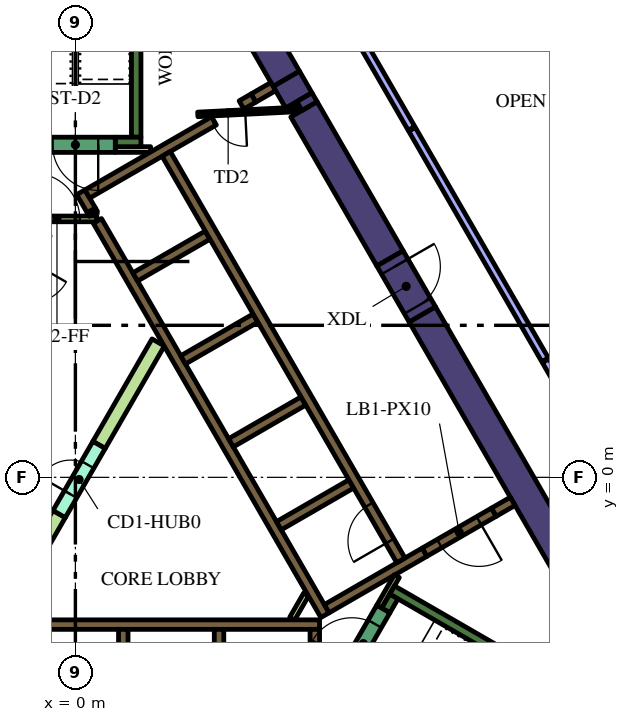
"""IFC4 building model, lengths in metres.
Left out: names, types, materials, properties, quantities, classifications, styles, units other than length and angle.
Written with IfcOpenShell. Run it as: python <this file> out.ifc"""

import sys

from ifc_helpers import new_model, si_unit, direction, frame, frame_2d, origin, place, context, subcontext, project, spatial, polyline, rectangle, outline, extrude, element, fill, save


model = new_model("IFC4")
c1 = context("Model", 3, precision=1e-05, world=origin(), true_north=direction((0.0, 1.0)))
c2 = subcontext(c1, "Body", "Model", "MODEL_VIEW")
j1 = project(units=[si_unit("LENGTHUNIT", "METRE"), si_unit("PLANEANGLEUNIT", "RADIAN")], contexts=[c1])
p1 = place(None, origin())
s1 = spatial("IfcSite", under=j1, at=p1, CompositionType="ELEMENT")
p2 = place(p1, origin())
s2 = spatial("IfcBuilding", under=s1, at=p2, CompositionType="ELEMENT")
p3 = place(p2, frame((0.0, 0.0, 183.6)))
s3 = spatial("IfcBuildingStorey", under=s2, at=p3, CompositionType="ELEMENT", Elevation=183.6)
p4 = place(p3, frame((9.129, 4.289, 0.0), z_axis=(0.0, 0.0, 1.0), x_axis=(0.499995742806, -0.866027861663, 0.0)))
e1 = element("IfcWall", 1, at=p4, inside=s3, PredefinedType="SOLIDWALL", context=c2, shape_type="SweptSolid", body=[
    extrude(rectangle(XDim=12.527, YDim=0.8, at=frame_2d((6.264, 0.0))), origin(), (0.0, 0.0, 1.0), 4.2),
])
p5 = place(p3, frame((5.878, 9.918, 0.0), z_axis=(0.0, 0.0, 1.0), x_axis=(-0.499893918903, 0.866086641072, 0.0)))
e2 = element("IfcWall", 2, at=p5, inside=s3, PredefinedType="SOLIDWALL", context=c2, shape_type="SweptSolid", body=[
    extrude(rectangle(XDim=0.657, YDim=0.8, at=frame_2d((0.329, 0.0))), origin(), (0.0, 0.0, 1.0), 4.2),
])
p6 = place(p3, frame((8.279, 5.761, 0.0), z_axis=(0.0, 0.0, 1.0), x_axis=(-0.500024261398, 0.866011396007, 0.0)))
e3 = element("IfcWall", 3, at=p6, inside=s3, PredefinedType="SOLIDWALL", context=c2, shape_type="SweptSolid", body=[
    extrude(rectangle(XDim=4.528, YDim=0.8, at=frame_2d((2.264, 0.0))), origin(), (0.0, 0.0, 1.0), 4.2),
])
p7 = place(p3, origin())
e4 = element("IfcWall", 4, at=p7, inside=s3, PredefinedType="SOLIDWALL", context=c2, shape_type="SweptSolid", body=[
    extrude(outline(polyline([(5.961, 9.654), (5.827, 9.886), (6.226, 10.116), (6.36, 9.884), (5.961, 9.654)])), origin(), (0.0, 0.0, 1.0), 4.2),
])
p8 = place(p3, frame((5.549, 10.489, 0.0), z_axis=(0.0, 0.0, 1.0), x_axis=(-0.50001746176, 0.866015321998, 0.0)))
e5 = element("IfcWall", 5, at=p8, inside=s3, PredefinedType="SOLIDWALL", context=c2, shape_type="SweptSolid", body=[
    extrude(rectangle(XDim=7.068, YDim=0.8, at=frame_2d((3.534, 0.0))), origin(), (0.0, 0.0, 1.0), 4.2),
])
p9 = place(p3, frame((8.334, -2.964, 0.0), z_axis=(0.0, 0.0, 1.0), x_axis=(0.866016039709, -0.500016218704, 0.0)))
e6 = element("IfcWall", 6, at=p9, inside=s3, PredefinedType="SOLIDWALL", context=c2, shape_type="SweptSolid", body=[
    extrude(rectangle(XDim=7.05, YDim=0.25, at=frame_2d((3.525, 0.0))), origin(), (0.0, 0.0, 1.0), 4.2),
])
p10 = place(p3, frame((8.168, -3.503, 0.0), z_axis=(0.0, 0.0, 1.0), x_axis=(0.49972245349, 0.866185586049, 0.0)))
e7 = element("IfcWall", 7, at=p10, inside=s3, PredefinedType="SOLIDWALL", context=c2, shape_type="SweptSolid", body=[
    extrude(rectangle(XDim=0.425, YDim=0.25, at=frame_2d((0.212, 0.0))), origin(), (0.0, 0.0, 1.0), 4.2),
])
p11 = place(p3, frame((1.6, 8.95, 0.0), z_axis=(0.0, 0.0, 1.0), x_axis=(0.0, 1.0, 0.0)))
e8 = element("IfcWall", 8, at=p11, inside=s3, PredefinedType="SOLIDWALL", context=c2, shape_type="SweptSolid", body=[
    extrude(rectangle(XDim=6.8, YDim=0.25, at=frame_2d((3.4, 0.0))), origin(), (0.0, 0.0, 1.0), 4.2),
])
p12 = place(p3, frame((1.05, 8.825, 0.0), z_axis=(0.0, 0.0, 1.0), x_axis=(1.0, 0.0, 0.0)))
e9 = element("IfcWall", 9, at=p12, inside=s3, PredefinedType="SOLIDWALL", context=c2, shape_type="SweptSolid", body=[
    extrude(rectangle(XDim=0.675, YDim=0.25, at=frame_2d((0.337, 0.0))), origin(), (0.0, 0.0, 1.0), 4.2),
])
p13 = place(p3, frame((-5.545, -3.875, 0.0), z_axis=(0.0, 0.0, 1.0), x_axis=(1.0, 0.0, 0.0)))
e10 = element("IfcWall", 10, at=p13, inside=s3, PredefinedType="SOLIDWALL", context=c2, shape_type="SweptSolid", body=[
    extrude(rectangle(XDim=11.97, YDim=0.25, at=frame_2d((5.985, 0.0))), origin(), (0.0, 0.0, 1.0), 4.2),
])
p14 = place(p3, frame((6.3, -7.24, 0.0), z_axis=(0.0, 0.0, 1.0), x_axis=(0.0, 1.0, 0.0)))
e11 = element("IfcWall", 11, at=p14, inside=s3, PredefinedType="SOLIDWALL", context=c2, shape_type="SweptSolid", body=[
    extrude(rectangle(XDim=3.24, YDim=0.25, at=frame_2d((1.62, 0.0))), origin(), (0.0, 0.0, 1.0), 4.2),
])
for number, where, z_axis, x_axis in (
    (12, (3.78, -4.0, 0.0), (0.0, 0.0, 1.0), (0.0, -1.0, 0.0)),
    (13, (1.26, -4.0, 0.0), (0.0, 0.0, 1.0), (0.0, -1.0, 0.0)),
):
    element("IfcWall", number, at=place(p3, frame(where, z_axis=z_axis, x_axis=x_axis)), inside=s3, PredefinedType="SOLIDWALL", context=c2, shape_type="SweptSolid", body=[
        extrude(rectangle(XDim=2.2, YDim=0.25, at=frame_2d((1.1, 0.0))), origin(), (0.0, 0.0, 1.0), 4.2),
    ])
p15 = place(p3, frame((11.507, -0.631, 0.0), z_axis=(0.0, 0.0, 1.0), x_axis=(-0.866093731455, -0.499881634324, 0.0)))
e14 = element("IfcWall", 14, at=p15, inside=s3, PredefinedType="SOLIDWALL", context=c2, shape_type="SweptSolid", body=[
    extrude(rectangle(XDim=0.575, YDim=0.25, at=frame_2d((0.288, 0.0))), origin(), (0.0, 0.0, 1.0), 4.2),
])
p16 = place(p3, frame((0.473, 6.93, 0.0), z_axis=(0.0, 0.0, 1.0), x_axis=(-0.49972245349, 0.866185586049, 0.0)))
e15 = element("IfcWall", 15, at=p16, inside=s3, PredefinedType="SOLIDWALL", context=c2, shape_type="SweptSolid", body=[
    extrude(rectangle(XDim=0.11, YDim=0.25, at=frame_2d((0.055, 0.0))), origin(), (0.0, 0.0, 1.0), 4.2),
])
p17 = place(p3, frame((6.568, -3.627, 0.0), z_axis=(0.0, 0.0, 1.0), x_axis=(-0.499999455981, 0.866025717874, 0.0)))
e16 = element("IfcWall", 16, at=p17, inside=s3, PredefinedType="SOLIDWALL", context=c2, shape_type="SweptSolid", body=[
    extrude(rectangle(XDim=11.978, YDim=0.25, at=frame_2d((5.989, 0.0))), origin(), (0.0, 0.0, 1.0), 4.2),
])
p18 = place(p3, frame((0.417, 7.027, 0.0), z_axis=(0.0, 0.0, 1.0), x_axis=(-0.500210807569, 0.865903659763, 0.0)))
e17 = element("IfcWall", 17, at=p18, inside=s3, PredefinedType="SOLIDWALL", context=c2, shape_type="SweptSolid", body=[
    extrude(rectangle(XDim=0.548, YDim=0.25, at=frame_2d((0.274, 0.0))), origin(), (0.0, 0.0, 1.0), 4.2),
])
p19 = place(p3, frame((3.647, 9.38, 0.0), z_axis=(0.0, 0.0, 1.0), x_axis=(-0.866025015791, -0.500000672024, 0.0)))
e18 = element("IfcWall", 18, at=p19, inside=s3, PredefinedType="SOLIDWALL", context=c2, shape_type="SweptSolid", body=[
    extrude(rectangle(XDim=3.849, YDim=0.25, at=frame_2d((1.924, 0.0))), origin(), (0.0, 0.0, 1.0), 4.2),
])
p20 = place(p3, frame((1.574, 5.274, 0.0), z_axis=(0.0, 0.0, 1.0), x_axis=(0.866028486751, 0.499994660107, 0.0)))
e19 = element("IfcWall", 19, at=p20, inside=s3, PredefinedType="SOLIDWALL", context=c2, shape_type="SweptSolid", body=[
    extrude(rectangle(XDim=2.2, YDim=0.25, at=frame_2d((1.1, 0.0))), origin(), (0.0, 0.0, 1.0), 4.2),
])
for number, where, z_axis, x_axis in (
    (20, (2.834, 3.091, 0.0), (0.0, 0.0, 1.0), (0.866, 0.5, 0.0)),
    (21, (4.094, 0.909, 0.0), (0.0, 0.0, 1.0), (0.866, 0.5, 0.0)),
    (22, (5.354, -1.274, 0.0), (0.0, 0.0, 1.0), (0.866, 0.5, 0.0)),
):
    element("IfcWall", number, at=place(p3, frame(where, z_axis=z_axis, x_axis=x_axis)), inside=s3, PredefinedType="SOLIDWALL", context=c2, shape_type="SweptSolid", body=[
        extrude(rectangle(XDim=2.2, YDim=0.25, at=frame_2d((1.1, 0.0))), origin(), (0.0, 0.0, 1.0), 4.2),
    ])
p21 = place(p3, frame((6.614, -3.456, 0.0), z_axis=(0.0, 0.0, 1.0), x_axis=(0.866032512851, 0.499987686533, 0.0)))
e23 = element("IfcWall", 23, at=p21, inside=s3, PredefinedType="SOLIDWALL", context=c2, shape_type="SweptSolid", body=[
    extrude(rectangle(XDim=2.975, YDim=0.25, at=frame_2d((1.487, 0.0))), origin(), (0.0, 0.0, 1.0), 4.2),
])
p22 = place(p3, frame((4.688, 9.981, 0.0), z_axis=(0.0, 0.0, 1.0), x_axis=(-0.865974312977, -0.500088481434, 0.0)))
e24 = element("IfcWall", 24, at=p22, inside=s3, PredefinedType="SOLIDWALL", context=c2, shape_type="SweptSolid", body=[
    extrude(rectangle(XDim=0.366, YDim=0.25, at=frame_2d((0.183, 0.0))), origin(), (0.0, 0.0, 1.0), 4.2),
])
p23 = place(p3, frame((4.689, 9.982, 0.0), z_axis=(0.0, 0.0, 1.0), x_axis=(0.865947592822, 0.500134748329, 0.0)))
e25 = element("IfcWall", 25, at=p23, inside=s3, PredefinedType="SOLIDWALL", context=c2, shape_type="SweptSolid", body=[
    extrude(rectangle(XDim=0.598, YDim=0.25, at=frame_2d((0.299, 0.0))), origin(), (0.0, 0.0, 1.0), 4.2),
])
p24 = place(p3, frame((1.05, 8.625, 0.0), z_axis=(0.0, 0.0, 1.0), x_axis=(1.0, 0.0, 0.0)))
e26 = element("IfcWall", 26, at=p24, inside=s3, PredefinedType="PARTITIONING", context=c2, shape_type="SweptSolid", body=[
    extrude(rectangle(XDim=0.929, YDim=0.15, at=frame_2d((0.464, 0.0))), origin(), (0.0, 0.0, 1.0), 3.15),
])
p25 = place(p3, frame((8.459, -2.599, 0.0), z_axis=(0.0, 0.0, 1.0), x_axis=(-0.500041054325, -0.866001699761, 0.0)))
e27 = element("IfcWall", 27, at=p25, inside=s3, PredefinedType="PARTITIONING", context=c2, shape_type="SweptSolid", body=[
    extrude(rectangle(XDim=0.929, YDim=0.15, at=frame_2d((0.464, 0.0))), origin(), (0.0, 0.0, 1.0), 4.2),
])
p26 = place(p3, frame((5.705, -3.718, 0.0), z_axis=(0.0, 0.0, 1.0), x_axis=(0.499962090823, 0.866047289552, 0.0)))
e28 = element("IfcWall", 28, at=p26, inside=s3, PredefinedType="PARTITIONING", context=c2, shape_type="SweptSolid", body=[
    extrude(rectangle(XDim=0.735, YDim=0.15, at=frame_2d((0.367, 0.0))), origin(), (0.0, 0.0, 1.0), 3.15),
])
e29 = element("IfcWall", 29, at=p7, inside=s3, PredefinedType="PARTITIONING", context=c2, shape_type="SweptSolid", body=[
    extrude(outline(polyline([(2.017, 3.643), (2.342, 3.456), (0.785, 0.76), (0.46, 0.947), (2.017, 3.643)])), origin(), (0.0, 0.0, 1.0), 3.15),
])
e30 = element("IfcWall", 30, at=p7, inside=s3, PredefinedType="PARTITIONING", context=c2, shape_type="SweptSolid", body=[
    extrude(outline(polyline([(-0.59, -0.872), (-0.265, -1.059), (-1.822, -3.756), (-2.147, -3.568), (-0.59, -0.872)])), origin(), (0.0, 0.0, 1.0), 3.15),
])
p27 = place(p3, frame((8.565, -2.185, 0.0), z_axis=(0.0, 0.0, 1.0), x_axis=(-0.499997954832, 0.866026584559, 0.0)))
e31 = element("IfcWall", 31, at=p27, inside=s3, PredefinedType="SOLIDWALL", context=c2, shape_type="SweptSolid", body=[
    extrude(rectangle(XDim=12.35, YDim=0.25, at=frame_2d((6.175, 0.0))), origin(), (0.0, 0.0, 1.0), 4.2),
])
p28 = place(p27, frame((0.585, 0.0, 0.0)))
e32 = element("IfcOpeningElement", 32, at=p28, cuts=e31, PredefinedType="OPENING", context=c2, shape_type="SweptSolid", body=[
    extrude(rectangle(XDim=1.1, YDim=2.1, at=frame_2d((0.55, 1.05))), frame((0.0, 0.135, 0.0), z_axis=(0.0, -1.0, 0.0), x_axis=(1.0, 0.0, 0.0)), (0.0, 0.0, 1.0), 0.27),
])
p29 = place(p3, frame((7.053, -5.284, 0.0), z_axis=(0.0, 0.0, 1.0), x_axis=(0.500078061341, 0.865980330357, 0.0)))
e33 = element("IfcWall", 33, at=p29, inside=s3, PredefinedType="SOLIDWALL", context=c2, shape_type="SweptSolid", body=[
    extrude(rectangle(XDim=2.1, YDim=0.4, at=frame_2d((1.05, 0.0))), origin(), (0.0, 0.0, 1.0), 4.2),
])
p30 = place(p29, frame((0.45, 0.0, 0.0)))
e34 = element("IfcOpeningElement", 34, at=p30, cuts=e33, PredefinedType="OPENING", context=c2, shape_type="SweptSolid", body=[
    extrude(rectangle(XDim=1.2, YDim=2.1, at=frame_2d((0.6, 1.05))), frame((0.0, 0.21, 0.0), z_axis=(0.0, -1.0, 0.0), x_axis=(1.0, 0.0, 0.0)), (0.0, 0.0, 1.0), 0.42),
])
p31 = place(p3, frame((1.05, 8.75, 0.0), z_axis=(0.0, 0.0, 1.0), x_axis=(-1.0, 0.0, 0.0)))
e35 = element("IfcWall", 35, at=p31, inside=s3, PredefinedType="SOLIDWALL", context=c2, shape_type="SweptSolid", body=[
    extrude(rectangle(XDim=2.1, YDim=0.4, at=frame_2d((1.05, 0.0))), origin(), (0.0, 0.0, 1.0), 4.2),
])
p32 = place(p31, frame((0.45, 0.0, 0.0)))
e36 = element("IfcOpeningElement", 36, at=p32, cuts=e35, PredefinedType="OPENING", context=c2, shape_type="SweptSolid", body=[
    extrude(rectangle(XDim=1.2, YDim=2.1, at=frame_2d((0.6, 1.05))), frame((0.0, 0.21, 0.0), z_axis=(0.0, -1.0, 0.0), x_axis=(1.0, 0.0, 0.0)), (0.0, 0.0, 1.0), 0.42),
])
p33 = place(p3, frame((5.917, 9.684, 0.0), z_axis=(0.0, 0.0, 1.0), x_axis=(-0.998758194515, -0.049820366212, 0.0)))
e37 = element("IfcWall", 37, at=p33, inside=s3, PredefinedType="PARTITIONING", context=c2, shape_type="SweptSolid", body=[
    extrude(rectangle(XDim=2.7, YDim=0.12, at=frame_2d((1.35, 0.0))), origin(), (0.0, 0.0, 1.0), 3.15),
])
p34 = place(p33, frame((1.45, 0.0, 0.0)))
e38 = element("IfcOpeningElement", 38, at=p34, cuts=e37, PredefinedType="OPENING", context=c2, shape_type="SweptSolid", body=[
    extrude(rectangle(XDim=0.9, YDim=2.1, at=frame_2d((0.45, 1.05))), frame((0.0, 0.07, 0.0), z_axis=(0.0, -1.0, 0.0), x_axis=(1.0, 0.0, 0.0)), (0.0, 0.0, 1.0), 0.14),
])
p35 = place(p3, frame((-0.427, -0.966, 0.0), z_axis=(0.0, 0.0, 1.0), x_axis=(0.49994051562, 0.866059744384, 0.0)))
e39 = element("IfcWall", 39, at=p35, inside=s3, PredefinedType="PARTITIONING", context=c2, shape_type="SweptSolid", body=[
    extrude(rectangle(XDim=2.1, YDim=0.375, at=frame_2d((1.05, 0.0))), origin(), (0.0, 0.0, 1.0), 3.15),
])
p36 = place(p35, frame((0.6, 0.0, 0.0)))
e40 = element("IfcOpeningElement", 40, at=p36, cuts=e39, PredefinedType="OPENING", context=c2, shape_type="SweptSolid", body=[
    extrude(rectangle(XDim=0.9, YDim=2.1, at=frame_2d((0.45, 1.05))), frame((0.0, 0.198, 0.0), z_axis=(0.0, -1.0, 0.0), x_axis=(1.0, 0.0, 0.0)), (0.0, 0.0, 1.0), 0.395),
])
p37 = place(p3, frame((-1.534, 6.8, 0.0), z_axis=(0.0, 0.0, 1.0), x_axis=(1.0, 0.0, 0.0)))
e41 = element("IfcWall", 41, at=p37, inside=s3, PredefinedType="PARTITIONING", context=c2, shape_type="SweptSolid", body=[
    extrude(rectangle(XDim=2.1, YDim=0.15, at=frame_2d((1.05, 0.0))), origin(), (0.0, 0.0, 1.0), 3.15),
])
p38 = place(p37, frame((0.45, 0.0, 0.0)))
e42 = element("IfcOpeningElement", 42, at=p38, cuts=e41, PredefinedType="OPENING", context=c2, shape_type="SweptSolid", body=[
    extrude(rectangle(XDim=1.2, YDim=2.1, at=frame_2d((0.6, 1.05))), frame((0.0, 0.085, 0.0), z_axis=(0.0, -1.0, 0.0), x_axis=(1.0, 0.0, 0.0)), (0.0, 0.0, 1.0), 0.17),
])
p39 = place(p3, frame((11.009, -0.919, 0.0), z_axis=(0.0, 0.0, 1.0), x_axis=(-0.866059744384, -0.49994051562, 0.0)))
e43 = element("IfcWall", 43, at=p39, inside=s3, PredefinedType="SOLIDWALL", context=c2, shape_type="SweptSolid", body=[
    extrude(rectangle(XDim=2.1, YDim=0.25, at=frame_2d((1.05, 0.0))), origin(), (0.0, 0.0, 1.0), 4.2),
])
p40 = place(p39, frame((0.45, 0.0, 0.0)))
e44 = element("IfcOpeningElement", 44, at=p40, cuts=e43, PredefinedType="OPENING", context=c2, shape_type="SweptSolid", body=[
    extrude(rectangle(XDim=1.2, YDim=2.1, at=frame_2d((0.6, 1.05))), frame((0.0, 0.135, 0.0), z_axis=(0.0, -1.0, 0.0), x_axis=(1.0, 0.0, 0.0)), (0.0, 0.0, 1.0), 0.27),
])
p41 = place(p3, frame((8.279, 5.761, 0.0), z_axis=(0.0, 0.0, 1.0), x_axis=(0.500062241894, -0.865989465428, 0.0)))
e45 = element("IfcWall", 45, at=p41, inside=s3, PredefinedType="SOLIDWALL", context=c2, shape_type="SweptSolid", body=[
    extrude(rectangle(XDim=1.7, YDim=0.8, at=frame_2d((0.85, 0.0))), origin(), (0.0, 0.0, 1.0), 4.2),
])
p42 = place(p41, frame((0.25, 0.0, 0.0)))
e46 = element("IfcOpeningElement", 46, at=p42, cuts=e45, PredefinedType="OPENING", context=c2, shape_type="SweptSolid", body=[
    extrude(rectangle(XDim=1.2, YDim=2.1, at=frame_2d((0.6, 1.05))), frame((0.0, 0.41, 0.0), z_axis=(0.0, -1.0, 0.0), x_axis=(1.0, 0.0, 0.0)), (0.0, 0.0, 1.0), 0.82),
])
p43 = place(p3, frame((12.359, 3.094, 0.0), z_axis=(0.0, 0.0, 1.0), x_axis=(-0.500010275428, 0.866019471182, 0.0)))
e47 = element("IfcWall", 47, at=p43, inside=s3, PredefinedType="PARTITIONING", context=c2, shape_type="SweptSolid", body=[
    extrude(rectangle(XDim=7.0, YDim=0.2, at=frame_2d((3.5, 0.0))), origin(), (0.0, 0.0, 1.0), 3.15),
])
p44 = place(p3, frame((8.844, 9.182, 0.0), z_axis=(0.0, 0.0, 1.0), x_axis=(-0.50000000053, 0.866025403479, 0.0)))
e48 = element("IfcWall", 48, at=p44, inside=s3, PredefinedType="PARTITIONING", context=c2, shape_type="SweptSolid", body=[
    extrude(rectangle(XDim=9.188, YDim=0.2, at=frame_2d((4.594, 0.0))), origin(), (0.0, 0.0, 1.0), 3.15),
])
p45 = place(p44, frame((4.1, 0.0, 0.0)))
e49 = element("IfcOpeningElement", 49, at=p45, cuts=e48, PredefinedType="OPENING", context=c2, shape_type="SweptSolid", body=[
    extrude(rectangle(XDim=1.0, YDim=2.1, at=frame_2d((0.5, 1.05))), frame((0.0, 0.11, 0.0), z_axis=(0.0, -1.0, 0.0), x_axis=(1.0, 0.0, 0.0)), (0.0, 0.0, 1.0), 0.22),
])
p46 = place(p3, frame((13.765, 0.659, 0.0), z_axis=(0.0, 0.0, 1.0), x_axis=(-0.500046568876, 0.865998515562, 0.0)))
e50 = element("IfcWall", 50, at=p46, inside=s3, PredefinedType="PARTITIONING", context=c2, shape_type="SweptSolid", body=[
    extrude(rectangle(XDim=2.782, YDim=0.2, at=frame_2d((1.391, 0.0))), origin(), (0.0, 0.0, 1.0), 3.15),
])
p47 = place(p28, origin())
e51 = element("IfcDoor", 51, at=p47, inside=s3, OperationType="DOUBLE_DOOR_SLIDING", PredefinedType="DOOR", context=c2, shape_type="SweptSolid", body=[
    extrude(rectangle(XDim=1.1, YDim=2.1, at=frame_2d((0.55, 1.05))), frame((0.0, 0.025, 0.0), z_axis=(0.0, -1.0, 0.0), x_axis=(1.0, 0.0, 0.0)), (0.0, 0.0, 1.0), 0.05),
])
fill(e32, e51)
p48 = place(p30, origin())
e52 = element("IfcDoor", 52, at=p48, inside=s3, OperationType="SINGLE_SWING_LEFT", PredefinedType="DOOR", context=c2, shape_type="SweptSolid", body=[
    extrude(rectangle(XDim=1.2, YDim=2.1, at=frame_2d((0.6, 1.05))), frame((0.0, 0.025, 0.0), z_axis=(0.0, -1.0, 0.0), x_axis=(1.0, 0.0, 0.0)), (0.0, 0.0, 1.0), 0.05),
])
fill(e34, e52)
p49 = place(p32, origin())
e53 = element("IfcDoor", 53, at=p49, inside=s3, OperationType="SINGLE_SWING_LEFT", PredefinedType="DOOR", context=c2, shape_type="SweptSolid", body=[
    extrude(rectangle(XDim=1.2, YDim=2.1, at=frame_2d((0.6, 1.05))), frame((0.0, 0.025, 0.0), z_axis=(0.0, -1.0, 0.0), x_axis=(1.0, 0.0, 0.0)), (0.0, 0.0, 1.0), 0.05),
])
fill(e36, e53)
p50 = place(p34, origin())
e54 = element("IfcDoor", 54, at=p50, inside=s3, OperationType="SINGLE_SWING_LEFT", PredefinedType="DOOR", context=c2, shape_type="SweptSolid", body=[
    extrude(rectangle(XDim=0.9, YDim=2.1, at=frame_2d((0.45, 1.05))), frame((0.0, 0.025, 0.0), z_axis=(0.0, -1.0, 0.0), x_axis=(1.0, 0.0, 0.0)), (0.0, 0.0, 1.0), 0.05),
])
fill(e38, e54)
p51 = place(p36, origin())
e55 = element("IfcDoor", 55, at=p51, inside=s3, OperationType="SINGLE_SWING_LEFT", PredefinedType="DOOR", context=c2, shape_type="SweptSolid", body=[
    extrude(rectangle(XDim=0.9, YDim=2.1, at=frame_2d((0.45, 1.05))), frame((0.0, 0.025, 0.0), z_axis=(0.0, -1.0, 0.0), x_axis=(1.0, 0.0, 0.0)), (0.0, 0.0, 1.0), 0.05),
])
fill(e40, e55)
p52 = place(p38, origin())
e56 = element("IfcDoor", 56, at=p52, inside=s3, OperationType="SINGLE_SWING_LEFT", PredefinedType="DOOR", context=c2, shape_type="SweptSolid", body=[
    extrude(rectangle(XDim=1.2, YDim=2.1, at=frame_2d((0.6, 1.05))), frame((0.0, 0.025, 0.0), z_axis=(0.0, -1.0, 0.0), x_axis=(1.0, 0.0, 0.0)), (0.0, 0.0, 1.0), 0.05),
])
fill(e42, e56)
p53 = place(p40, origin())
e57 = element("IfcDoor", 57, at=p53, inside=s3, OperationType="SINGLE_SWING_LEFT", PredefinedType="DOOR", context=c2, shape_type="SweptSolid", body=[
    extrude(rectangle(XDim=1.2, YDim=2.1, at=frame_2d((0.6, 1.05))), frame((0.0, 0.025, 0.0), z_axis=(0.0, -1.0, 0.0), x_axis=(1.0, 0.0, 0.0)), (0.0, 0.0, 1.0), 0.05),
])
fill(e44, e57)
p54 = place(p42, origin())
e58 = element("IfcDoor", 58, at=p54, inside=s3, OperationType="SINGLE_SWING_LEFT", PredefinedType="DOOR", context=c2, shape_type="SweptSolid", body=[
    extrude(rectangle(XDim=1.2, YDim=2.1, at=frame_2d((0.6, 1.05))), frame((0.0, 0.025, 0.0), z_axis=(0.0, -1.0, 0.0), x_axis=(1.0, 0.0, 0.0)), (0.0, 0.0, 1.0), 0.05),
])
fill(e46, e58)
save(model, sys.argv[1])
